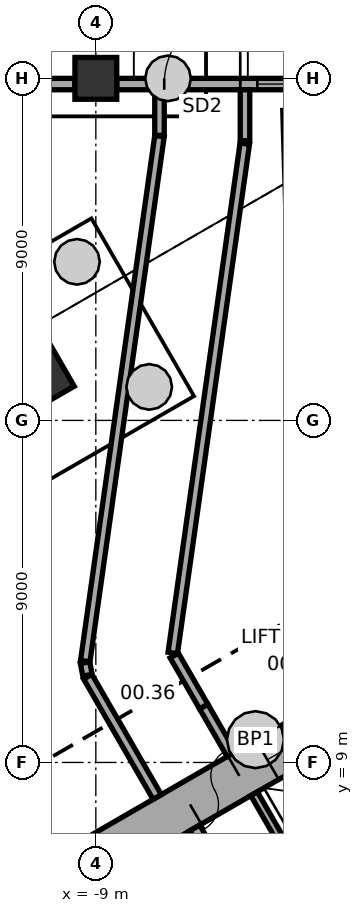
"""IFC4 building model, lengths in metres.
Left out: names, types, materials, properties, quantities, classifications, styles, units other than length and angle.
Written with IfcOpenShell. Run it as: python <this file> out.ifc"""

import sys

from ifc_helpers import new_model, si_unit, direction, frame, frame_2d, origin, origin_2d, place, context, subcontext, project, spatial, rectangle, extrude, element, fill, save


model = new_model("IFC4")
c1 = context("Model", 3, precision=1e-05, world=origin(), true_north=direction((0.0, 1.0)))
c2 = subcontext(c1, "Body", "Model", "MODEL_VIEW")
j1 = project(units=[si_unit("LENGTHUNIT", "METRE"), si_unit("PLANEANGLEUNIT", "RADIAN")], contexts=[c1])
p1 = place(None, origin())
s1 = spatial("IfcSite", under=j1, at=p1, CompositionType="ELEMENT")
p2 = place(p1, origin())
s2 = spatial("IfcBuilding", under=s1, at=p2, CompositionType="ELEMENT")
p3 = place(p2, origin())
s3 = spatial("IfcBuildingStorey", under=s2, at=p3, CompositionType="ELEMENT", Elevation=0.0)
p4 = place(p3, frame((-11.837, 18.627, -0.3), z_axis=(0.0, 0.0, 1.0), x_axis=(-0.866028021766, -0.499995465495, 0.0)))
e1 = element("IfcColumn", 1, at=p4, inside=s3, PredefinedType="COLUMN", context=c2, shape_type="SweptSolid", body=[
    extrude(rectangle(XDim=4.2, YDim=1.8, at=origin_2d()), origin(), (0.0, 0.0, 1.0), 7.8),
])
p5 = place(p3, frame((-9.0, 27.0, -0.3), z_axis=(0.0, 0.0, 1.0), x_axis=(1.0, 0.0, 0.0)))
e2 = element("IfcColumn", 2, at=p5, inside=s3, PredefinedType="COLUMN", context=c2, shape_type="SweptSolid", body=[
    extrude(rectangle(XDim=1.1, YDim=1.1, at=origin_2d()), origin(), (0.0, 0.0, 1.0), 7.8),
])
p6 = place(p3, frame((0.3, 11.836, -0.3), z_axis=(0.0, 0.0, 1.0), x_axis=(-0.866021384402, -0.500006961711, 0.0)))
e3 = element("IfcWall", 3, at=p6, inside=s3, PredefinedType="SHEAR", context=c2, shape_type="SweptSolid", body=[
    extrude(rectangle(XDim=12.355, YDim=1.2, at=frame_2d((6.178, 0.0))), origin(), (0.0, 0.0, 1.0), 7.8),
])
p7 = place(p6, frame((6.378, 0.0, 0.3)))
e4 = element("IfcOpeningElement", 4, at=p7, cuts=e3, PredefinedType="OPENING", context=c2, shape_type="SweptSolid", body=[
    extrude(rectangle(XDim=1.5, YDim=2.1, at=frame_2d((0.75, 1.05))), frame((0.0, 0.61, 0.0), z_axis=(0.0, -1.0, 0.0), x_axis=(1.0, 0.0, 0.0)), (0.0, 0.0, 1.0), 1.22),
])
p8 = place(p6, frame((1.828, 0.0, 0.3)))
e5 = element("IfcOpeningElement", 5, at=p8, cuts=e3, PredefinedType="OPENING", context=c2, shape_type="SweptSolid", body=[
    extrude(rectangle(XDim=1.1, YDim=2.1, at=frame_2d((0.55, 1.05))), frame((0.0, 0.61, 0.0), z_axis=(0.0, -1.0, 0.0), x_axis=(1.0, 0.0, 0.0)), (0.0, 0.0, 1.0), 1.22),
])
p9 = place(p6, frame((4.428, 0.0, 0.3)))
e6 = element("IfcOpeningElement", 6, at=p9, cuts=e3, PredefinedType="OPENING", context=c2, shape_type="SweptSolid", body=[
    extrude(rectangle(XDim=1.1, YDim=2.1, at=frame_2d((0.55, 1.05))), frame((0.0, 0.61, 0.0), z_axis=(0.0, -1.0, 0.0), x_axis=(1.0, 0.0, 0.0)), (0.0, 0.0, 1.0), 1.22),
])
p10 = place(p3, frame((8.45, 26.85, 0.0), z_axis=(0.0, 0.0, 1.0), x_axis=(-1.0, 0.0, 0.0)))
e7 = element("IfcWall", 7, at=p10, inside=s3, PredefinedType="STANDARD", context=c2, shape_type="SweptSolid", body=[
    extrude(rectangle(XDim=16.9, YDim=0.3, at=frame_2d((8.45, 0.0))), origin(), (0.0, 0.0, 1.0), 6.0),
])
p11 = place(p10, frame((2.45, 0.0, 4.7)))
e8 = element("IfcOpeningElement", 8, at=p11, cuts=e7, PredefinedType="OPENING", context=c2, shape_type="SweptSolid", body=[
    extrude(rectangle(XDim=3.0, YDim=1.3, at=frame_2d((1.5, 0.65))), frame((0.0, 0.16, 0.0), z_axis=(0.0, -1.0, 0.0), x_axis=(1.0, 0.0, 0.0)), (0.0, 0.0, 1.0), 0.32),
])
p12 = place(p10, frame((10.2, 0.0, 4.7)))
e9 = element("IfcOpeningElement", 9, at=p12, cuts=e7, PredefinedType="OPENING", context=c2, shape_type="SweptSolid", body=[
    extrude(rectangle(XDim=3.0, YDim=1.3, at=frame_2d((1.5, 0.65))), frame((0.0, 0.16, 0.0), z_axis=(0.0, -1.0, 0.0), x_axis=(1.0, 0.0, 0.0)), (0.0, 0.0, 1.0), 0.32),
])
p13 = place(p10, frame((9.3, 0.0, 0.0)))
e10 = element("IfcOpeningElement", 10, at=p13, cuts=e7, PredefinedType="OPENING", context=c2, shape_type="SweptSolid", body=[
    extrude(rectangle(XDim=1.3, YDim=2.4, at=frame_2d((0.65, 1.2))), frame((0.0, 0.16, 0.0), z_axis=(0.0, -1.0, 0.0), x_axis=(1.0, 0.0, 0.0)), (0.0, 0.0, 1.0), 0.32),
])
p14 = place(p10, frame((5.8, 0.0, 0.0)))
e11 = element("IfcOpeningElement", 11, at=p14, cuts=e7, PredefinedType="OPENING", context=c2, shape_type="SweptSolid", body=[
    extrude(rectangle(XDim=1.3, YDim=2.4, at=frame_2d((0.65, 1.2))), frame((0.0, 0.16, 0.0), z_axis=(0.0, -1.0, 0.0), x_axis=(1.0, 0.0, 0.0)), (0.0, 0.0, 1.0), 0.32),
])
p15 = place(p10, frame((2.3, 0.0, 0.0)))
e12 = element("IfcOpeningElement", 12, at=p15, cuts=e7, PredefinedType="OPENING", context=c2, shape_type="SweptSolid", body=[
    extrude(rectangle(XDim=1.3, YDim=2.4, at=frame_2d((0.65, 1.2))), frame((0.0, 0.16, 0.0), z_axis=(0.0, -1.0, 0.0), x_axis=(1.0, 0.0, 0.0)), (0.0, 0.0, 1.0), 0.32),
])
p16 = place(p10, frame((13.65, 0.0, 0.0)))
e13 = element("IfcOpeningElement", 13, at=p16, cuts=e7, PredefinedType="OPENING", context=c2, shape_type="SweptSolid", body=[
    extrude(rectangle(XDim=2.0, YDim=2.4, at=frame_2d((1.0, 1.2))), frame((0.0, 0.16, 0.0), z_axis=(0.0, -1.0, 0.0), x_axis=(1.0, 0.0, 0.0)), (0.0, 0.0, 1.0), 0.32),
])
p17 = place(p3, frame((-9.55, 26.85, 0.0), z_axis=(0.0, 0.0, 1.0), x_axis=(-1.0, 0.0, 0.0)))
e14 = element("IfcWall", 14, at=p17, inside=s3, PredefinedType="STANDARD", context=c2, shape_type="SweptSolid", body=[
    extrude(rectangle(XDim=16.9, YDim=0.3, at=frame_2d((8.45, 0.0))), origin(), (0.0, 0.0, 1.0), 6.0),
])
p18 = place(p17, frame((2.45, 0.0, 4.7)))
e15 = element("IfcOpeningElement", 15, at=p18, cuts=e14, PredefinedType="OPENING", context=c2, shape_type="SweptSolid", body=[
    extrude(rectangle(XDim=3.0, YDim=1.3, at=frame_2d((1.5, 0.65))), frame((0.0, 0.16, 0.0), z_axis=(0.0, -1.0, 0.0), x_axis=(1.0, 0.0, 0.0)), (0.0, 0.0, 1.0), 0.32),
])
p19 = place(p17, frame((11.45, 0.0, 4.7)))
e16 = element("IfcOpeningElement", 16, at=p19, cuts=e14, PredefinedType="OPENING", context=c2, shape_type="SweptSolid", body=[
    extrude(rectangle(XDim=3.0, YDim=1.3, at=frame_2d((1.5, 0.65))), frame((0.0, 0.16, 0.0), z_axis=(0.0, -1.0, 0.0), x_axis=(1.0, 0.0, 0.0)), (0.0, 0.0, 1.0), 0.32),
])
p20 = place(p17, frame((6.5, 0.0, 0.0)))
e17 = element("IfcOpeningElement", 17, at=p20, cuts=e14, PredefinedType="OPENING", context=c2, shape_type="SweptSolid", body=[
    extrude(rectangle(XDim=2.1, YDim=2.4, at=frame_2d((1.05, 1.2))), frame((0.0, 0.16, 0.0), z_axis=(0.0, -1.0, 0.0), x_axis=(1.0, 0.0, 0.0)), (0.0, 0.0, 1.0), 0.32),
])
p21 = place(p3, frame((-3.737, 6.272, 0.0), z_axis=(0.0, 0.0, 1.0), x_axis=(-0.50002983664, 0.866008176907, 0.0)))
e18 = element("IfcWall", 18, at=p21, inside=s3, PredefinedType="PARTITIONING", context=c2, shape_type="SweptSolid", body=[
    extrude(rectangle(XDim=2.2, YDim=0.2, at=frame_2d((1.1, 0.0))), origin(), (0.0, 0.0, 1.0), 7.2),
])
p22 = place(p3, frame((-5.295, 5.372, 0.0), z_axis=(0.0, 0.0, 1.0), x_axis=(-0.500077893725, 0.86598042715, 0.0)))
e19 = element("IfcWall", 19, at=p22, inside=s3, PredefinedType="SHEAR", context=c2, shape_type="SweptSolid", body=[
    extrude(rectangle(XDim=2.2, YDim=0.3, at=frame_2d((1.1, 0.0))), origin(), (0.0, 0.0, 1.0), 7.2),
])
p23 = place(p22, frame((0.7, 0.0, 0.0)))
e20 = element("IfcOpeningElement", 20, at=p23, cuts=e19, PredefinedType="OPENING", context=c2, shape_type="SweptSolid", body=[
    extrude(rectangle(XDim=1.1, YDim=2.1, at=frame_2d((0.55, 1.05))), frame((0.0, 0.16, 0.0), z_axis=(0.0, -1.0, 0.0), x_axis=(1.0, 0.0, 0.0)), (0.0, 0.0, 1.0), 0.32),
])
p24 = place(p3, frame((-7.385, 8.092, 0.0), z_axis=(0.0, 0.0, 1.0), x_axis=(-0.500011578892, 0.866018718605, 0.0)))
e21 = element("IfcWall", 21, at=p24, inside=s3, PredefinedType="SOLIDWALL", context=c2, shape_type="SweptSolid", body=[
    extrude(rectangle(XDim=3.655, YDim=0.25, at=frame_2d((1.827, 0.0))), origin(), (0.0, 0.0, 1.0), 7.2),
])
p25 = place(p3, frame((-6.162, 10.472, 0.0), z_axis=(0.0, 0.0, 1.0), x_axis=(0.500159754115, -0.865933150054, 0.0)))
e22 = element("IfcWall", 22, at=p25, inside=s3, PredefinedType="SOLIDWALL", context=c2, shape_type="SweptSolid", body=[
    extrude(rectangle(XDim=1.45, YDim=0.25, at=frame_2d((0.725, 0.0))), origin(), (0.0, 0.0, 1.0), 7.2),
])
p26 = place(p3, frame((-6.162, 10.472, 0.0), z_axis=(0.0, 0.0, 1.0), x_axis=(-0.499899694197, 0.866083307622, 0.0)))
e23 = element("IfcWall", 23, at=p26, inside=s3, PredefinedType="SOLIDWALL", context=c2, shape_type="SweptSolid", body=[
    extrude(rectangle(XDim=1.55, YDim=0.25, at=frame_2d((0.775, 0.0))), origin(), (0.0, 0.0, 1.0), 7.2),
])
p27 = place(p3, frame((-9.22, 11.296, 0.0), z_axis=(0.0, 0.0, 1.0), x_axis=(-0.189841665195, 0.981814718853, 0.0)))
e24 = element("IfcWall", 24, at=p27, inside=s3, PredefinedType="SOLIDWALL", context=c2, shape_type="SweptSolid", body=[
    extrude(rectangle(XDim=0.337, YDim=0.25, at=frame_2d((0.168, 0.0))), origin(), (0.0, 0.0, 1.0), 7.2),
])
p28 = place(p3, frame((-9.278, 11.666, 0.0), z_axis=(0.0, 0.0, 1.0), x_axis=(0.140022217881, 0.990148361863, 0.0)))
e25 = element("IfcWall", 25, at=p28, inside=s3, PredefinedType="SOLIDWALL", context=c2, shape_type="SweptSolid", body=[
    extrude(rectangle(XDim=13.95, YDim=0.25, at=frame_2d((6.975, 0.0))), origin(), (0.0, 0.0, 1.0), 7.2),
])
p29 = place(p3, frame((-5.081, 25.281, 0.0), z_axis=(0.0, 0.0, 1.0), x_axis=(-0.140032081435, -0.990146966954, 0.0)))
e26 = element("IfcWall", 26, at=p29, inside=s3, PredefinedType="SOLIDWALL", context=c2, shape_type="SweptSolid", body=[
    extrude(rectangle(XDim=13.533, YDim=0.25, at=frame_2d((6.766, 0.0))), origin(), (0.0, 0.0, 1.0), 7.2),
])
p30 = place(p3, frame((-7.325, 25.499, 0.0), z_axis=(0.0, 0.0, 1.0), x_axis=(0.0, 1.0, 0.0)))
e27 = element("IfcWall", 27, at=p30, inside=s3, PredefinedType="SOLIDWALL", context=c2, shape_type="SweptSolid", body=[
    extrude(rectangle(XDim=1.201, YDim=0.25, at=frame_2d((0.601, 0.0))), origin(), (0.0, 0.0, 1.0), 7.2),
])
p31 = place(p3, frame((-5.075, 26.7, 0.0), z_axis=(0.0, 0.0, 1.0), x_axis=(0.0, -1.0, 0.0)))
e28 = element("IfcWall", 28, at=p31, inside=s3, PredefinedType="SOLIDWALL", context=c2, shape_type="SweptSolid", body=[
    extrude(rectangle(XDim=1.339, YDim=0.25, at=frame_2d((0.67, 0.0))), origin(), (0.0, 0.0, 1.0), 7.2),
])
p32 = place(p12, origin())
e29 = element("IfcWindow", 29, at=p32, inside=s3, PartitioningType="SINGLE_PANEL", PredefinedType="WINDOW", context=c2, shape_type="SweptSolid", body=[
    extrude(rectangle(XDim=3.0, YDim=1.3, at=frame_2d((1.5, 0.65))), frame((0.0, 0.03, 0.0), z_axis=(0.0, -1.0, 0.0), x_axis=(1.0, 0.0, 0.0)), (0.0, 0.0, 1.0), 0.06),
])
fill(e9, e29)
p33 = place(p7, origin())
e30 = element("IfcDoor", 30, at=p33, inside=s3, OperationType="DOUBLE_DOOR_SINGLE_SWING", PredefinedType="DOOR", context=c2, shape_type="SweptSolid", body=[
    extrude(rectangle(XDim=1.5, YDim=2.1, at=frame_2d((0.75, 1.05))), frame((0.0, 0.025, 0.0), z_axis=(0.0, -1.0, 0.0), x_axis=(1.0, 0.0, 0.0)), (0.0, 0.0, 1.0), 0.05),
])
fill(e4, e30)
p34 = place(p9, origin())
e31 = element("IfcDoor", 31, at=p34, inside=s3, OperationType="DOUBLE_DOOR_SLIDING", PredefinedType="DOOR", context=c2, shape_type="SweptSolid", body=[
    extrude(rectangle(XDim=1.1, YDim=2.1, at=frame_2d((0.55, 1.05))), frame((0.0, 0.025, 0.0), z_axis=(0.0, -1.0, 0.0), x_axis=(1.0, 0.0, 0.0)), (0.0, 0.0, 1.0), 0.05),
])
fill(e6, e31)
p35 = place(p16, frame((2.0, 0.0, 0.0), z_axis=(0.0, 0.0, 1.0), x_axis=(-1.0, 0.0, 0.0)))
e32 = element("IfcDoor", 32, at=p35, inside=s3, OperationType="DOUBLE_DOOR_SINGLE_SWING", PredefinedType="DOOR", context=c2, shape_type="SweptSolid", body=[
    extrude(rectangle(XDim=2.0, YDim=2.4, at=frame_2d((1.0, 1.2))), frame((0.0, 0.025, 0.0), z_axis=(0.0, -1.0, 0.0), x_axis=(1.0, 0.0, 0.0)), (0.0, 0.0, 1.0), 0.05),
])
fill(e13, e32)
save(model, sys.argv[1])
